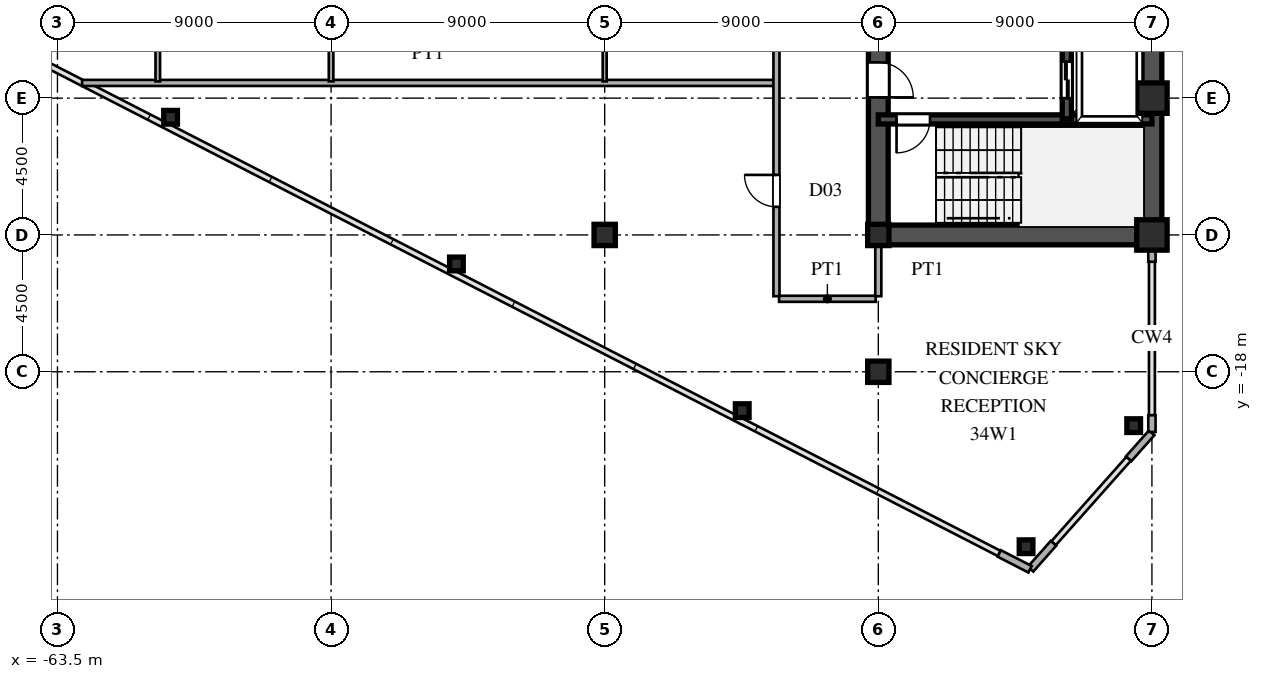
"""IFC4 building model, lengths in metres.
Left out: names, types, materials, properties, quantities, classifications, styles, units other than length and angle.
Written with IfcOpenShell. Run it as: python <this file> out.ifc"""

import sys

from ifc_helpers import new_model, si_unit, direction, frame, frame_2d, origin, origin_2d, place, context, subcontext, project, spatial, rectangle, hollow_rectangle, i_section, extrude, source, transform, mapped, element, fill, save


model = new_model("IFC4")
c1 = context("Model", 3, precision=1e-05, world=origin(), true_north=direction((0.0, 1.0)))
c2 = subcontext(c1, "Body", "Model", "MODEL_VIEW")
j1 = project(units=[si_unit("LENGTHUNIT", "METRE"), si_unit("PLANEANGLEUNIT", "RADIAN")], contexts=[c1])
p1 = place(None, origin())
s1 = spatial("IfcSite", under=j1, at=p1, CompositionType="ELEMENT")
p2 = place(p1, origin())
s2 = spatial("IfcBuilding", under=s1, at=p2, CompositionType="ELEMENT")
p3 = place(p2, frame((0.0, 0.0, 128.4)))
s3 = spatial("IfcBuildingStorey", under=s2, at=p3, CompositionType="ELEMENT", Elevation=128.4)
m1 = source(origin(), c2, "Body", "SweptSolid", [
    extrude(hollow_rectangle(XDim=1.0, YDim=1.0, WallThickness=0.042, at=origin_2d()), origin(), (0.0, 0.0, 1.0), 3.6),
])
for number, where, z_axis, x_axis in (
    (1, (-27.5, -13.5, 0.0), (0.0, 0.0, 1.0), (1.0, 0.0, 0.0)),
    (2, (-27.5, -9.0, 0.0), (0.0, 0.0, 1.0), (1.0, 0.0, 0.0)),
):
    element("IfcColumn", number, at=place(p3, frame(where, z_axis=z_axis, x_axis=x_axis)), inside=s3, PredefinedType="COLUMN", context=c2, shape_type="MappedRepresentation", body=[
        mapped(m1, transform((0.0, 0.0, 0.0), scale=1.0)),
    ])
m2 = source(origin(), c2, "Body", "SweptSolid", [
    extrude(i_section(OverallWidth=0.7, OverallDepth=0.7, WebThickness=0.028, FlangeThickness=0.045, at=origin_2d()), origin(), (0.0, 0.0, 1.0), 3.6),
])
for number, where, z_axis, x_axis in (
    (3, (-36.5, -18.0, 0.0), (0.0, 0.0, 1.0), (1.0, 0.0, 0.0)),
    (4, (-36.5, -13.5, 0.0), (0.0, 0.0, 1.0), (1.0, 0.0, 0.0)),
    (5, (-45.5, -13.5, 0.0), (0.0, 0.0, 1.0), (1.0, 0.0, 0.0)),
):
    element("IfcColumn", number, at=place(p3, frame(where, z_axis=z_axis, x_axis=x_axis)), inside=s3, PredefinedType="COLUMN", context=c2, shape_type="MappedRepresentation", body=[
        mapped(m2, transform((0.0, 0.0, 0.0), scale=1.0)),
    ])
m3 = source(origin(), c2, "Body", "SweptSolid", [
    extrude(hollow_rectangle(XDim=0.45, YDim=0.45, WallThickness=0.018, at=origin_2d()), origin(), (0.0, 0.0, 1.0), 3.6),
])
for number, where, z_axis, x_axis in (
    (6, (-28.1, -19.772, 0.0), (0.0, 0.0, 1.0), (1.0, 0.0, 0.0)),
    (7, (-31.64, -23.754, 0.0), (0.0, 0.0, 1.0), (1.0, 0.0, 0.0)),
    (8, (-40.976, -19.278, 0.0), (0.0, 0.0, 1.0), (1.0, 0.0, 0.0)),
    (9, (-50.377, -14.453, 0.0), (0.0, 0.0, 1.0), (1.0, 0.0, 0.0)),
    (10, (-59.779, -9.629, 0.0), (0.0, 0.0, 1.0), (1.0, 0.0, 0.0)),
):
    element("IfcColumn", number, at=place(p3, frame(where, z_axis=z_axis, x_axis=x_axis)), inside=s3, PredefinedType="COLUMN", context=c2, shape_type="MappedRepresentation", body=[
        mapped(m3, transform((0.0, 0.0, 0.0), scale=1.0)),
    ])
p4 = place(p3, frame((-27.5, -19.98, 0.0), z_axis=(0.0, 0.0, 1.0), x_axis=(0.0, 1.0, 0.0)))
e11 = element("IfcWall", 11, at=p4, inside=s3, PredefinedType="SOLIDWALL", context=c2, shape_type="SweptSolid", body=[
    extrude(rectangle(XDim=0.55, YDim=0.24, at=frame_2d((0.275, 0.0))), origin(), (0.0, 0.0, 1.0), 3.38),
])
p5 = place(p3, frame((-27.5, -14.38, 0.0), z_axis=(0.0, 0.0, 1.0), x_axis=(0.0, 1.0, 0.0)))
e12 = element("IfcWall", 12, at=p5, inside=s3, PredefinedType="SOLIDWALL", context=c2, shape_type="SweptSolid", body=[
    extrude(rectangle(XDim=0.55, YDim=0.24, at=frame_2d((0.275, 0.0))), origin(), (0.0, 0.0, 1.0), 2.88),
])
p6 = place(p3, frame((-32.523, -23.975, 0.0), z_axis=(0.0, 0.0, 1.0), x_axis=(0.889797395748, -0.456355776255, 0.0)))
e13 = element("IfcWall", 13, at=p6, inside=s3, PredefinedType="SOLIDWALL", context=c2, shape_type="SweptSolid", body=[
    extrude(rectangle(XDim=1.14, YDim=0.24, at=frame_2d((0.57, 0.0))), origin(), (0.0, 0.0, 1.0), 3.38),
])
for number, where, z_axis, x_axis in (
    (14, (-31.493, -24.492, 0.0), (0.0, 0.0, 1.0), (0.664, 0.747, 0.0)),
    (15, (-28.264, -20.86, 0.0), (0.0, 0.0, 1.0), (0.664, 0.747, 0.0)),
):
    element("IfcWall", number, at=place(p3, frame(where, z_axis=z_axis, x_axis=x_axis)), inside=s3, PredefinedType="SOLIDWALL", context=c2, shape_type="SweptSolid", body=[
        extrude(rectangle(XDim=1.14, YDim=0.24, at=frame_2d((0.57, 0.0))), origin(), (0.0, 0.0, 1.0), 3.38),
    ])
p7 = place(p3, frame((-27.5, -13.5, 0.0), z_axis=(0.0, 0.0, 1.0), x_axis=(0.0, 1.0, 0.0)))
e16 = element("IfcWall", 16, at=p7, inside=s3, PredefinedType="SHEAR", context=c2, shape_type="SweptSolid", body=[
    extrude(rectangle(XDim=12.2, YDim=0.65, at=frame_2d((6.1, 0.0))), origin(), (0.0, 0.0, 1.0), 3.38),
])
p8 = place(p3, frame((-36.5, -13.5, 0.0), z_axis=(0.0, 0.0, 1.0), x_axis=(1.0, 0.0, 0.0)))
e17 = element("IfcWall", 17, at=p8, inside=s3, PredefinedType="SHEAR", context=c2, shape_type="SweptSolid", body=[
    extrude(rectangle(XDim=9.0, YDim=0.65, at=frame_2d((4.5, 0.0))), origin(), (0.0, 0.0, 1.0), 3.38),
])
p9 = place(p3, frame((-36.5, -13.65, 0.0), z_axis=(0.0, 0.0, 1.0), x_axis=(0.0, 1.0, 0.0)))
e18 = element("IfcWall", 18, at=p9, inside=s3, PredefinedType="SHEAR", context=c2, shape_type="SweptSolid", body=[
    extrude(rectangle(XDim=7.15, YDim=0.65, at=frame_2d((3.575, 0.0))), origin(), (0.0, 0.0, 1.0), 3.38),
])
p10 = place(p9, frame((4.675, 0.0, 0.0)))
e19 = element("IfcOpeningElement", 19, at=p10, cuts=e18, PredefinedType="OPENING", context=c2, shape_type="SweptSolid", body=[
    extrude(rectangle(XDim=1.15, YDim=2.2, at=frame_2d((0.575, 1.1))), frame((0.0, 0.335, 0.0), z_axis=(0.0, -1.0, 0.0), x_axis=(1.0, 0.0, 0.0)), (0.0, 0.0, 1.0), 0.67),
])
p11 = place(p3, frame((-36.5, -9.7, 0.0), z_axis=(0.0, 0.0, 1.0), x_axis=(1.0, 0.0, 0.0)))
e20 = element("IfcWall", 20, at=p11, inside=s3, PredefinedType="SHEAR", context=c2, shape_type="SweptSolid", body=[
    extrude(rectangle(XDim=9.0, YDim=0.3, at=frame_2d((4.5, 0.0))), origin(), (0.0, 0.0, 1.0), 3.38),
])
p12 = place(p11, frame((0.6, 0.0, 0.0)))
e21 = element("IfcOpeningElement", 21, at=p12, cuts=e20, PredefinedType="OPENING", context=c2, shape_type="SweptSolid", body=[
    extrude(rectangle(XDim=1.1, YDim=2.2, at=frame_2d((0.55, 1.1))), frame((0.0, 0.16, 0.0), z_axis=(0.0, -1.0, 0.0), x_axis=(1.0, 0.0, 0.0)), (0.0, 0.0, 1.0), 0.32),
])
p13 = place(p3, frame((-30.3, -9.68, 0.0), z_axis=(0.0, 0.0, 1.0), x_axis=(0.0, 1.0, 0.0)))
e22 = element("IfcWall", 22, at=p13, inside=s3, PredefinedType="SHEAR", context=c2, shape_type="SweptSolid", body=[
    extrude(rectangle(XDim=2.56, YDim=0.3, at=frame_2d((1.28, 0.0))), origin(), (0.0, 0.0, 1.0), 3.38),
])
p14 = place(p13, frame((0.68, 0.0, 0.0)))
e23 = element("IfcOpeningElement", 23, at=p14, cuts=e22, PredefinedType="OPENING", context=c2, shape_type="SweptSolid", body=[
    extrude(rectangle(XDim=1.2, YDim=2.25, at=frame_2d((0.6, 1.125))), frame((0.0, 0.16, 0.0), z_axis=(0.0, -1.0, 0.0), x_axis=(1.0, 0.0, 0.0)), (0.0, 0.0, 1.0), 0.32),
])
p15 = place(p3, frame((-39.765, -15.6, 0.0), z_axis=(0.0, 0.0, 1.0), x_axis=(1.0, 0.0, 0.0)))
e24 = element("IfcWall", 24, at=p15, inside=s3, PredefinedType="PARTITIONING", context=c2, shape_type="SweptSolid", body=[
    extrude(rectangle(XDim=3.18, YDim=0.2, at=frame_2d((1.59, 0.0))), origin(), (0.0, 0.0, 1.0), 3.38),
])
p16 = place(p3, frame((-62.69, -8.5, 0.0), z_axis=(0.0, 0.0, 1.0), x_axis=(1.0, 0.0, 0.0)))
e25 = element("IfcWall", 25, at=p16, inside=s3, PredefinedType="PARTITIONING", context=c2, shape_type="SweptSolid", body=[
    extrude(rectangle(XDim=22.76, YDim=0.2, at=frame_2d((11.38, 0.0))), origin(), (0.0, 0.0, 1.0), 3.38),
])
p17 = place(p3, frame((-60.2, -8.45, 0.0), z_axis=(0.0, 0.0, 1.0), x_axis=(0.0, 1.0, 0.0)))
e26 = element("IfcWall", 26, at=p17, inside=s3, PredefinedType="PARTITIONING", context=c2, shape_type="SweptSolid", body=[
    extrude(rectangle(XDim=13.9, YDim=0.15, at=frame_2d((6.95, 0.0))), origin(), (0.0, 0.0, 1.0), 3.38),
])
p18 = place(p17, frame((1.808, 0.0, 0.0)))
e27 = element("IfcOpeningElement", 27, at=p18, cuts=e26, PredefinedType="OPENING", context=c2, shape_type="SweptSolid", body=[
    extrude(rectangle(XDim=0.95, YDim=2.15, at=frame_2d((0.475, 1.075))), frame((0.0, 0.085, 0.0), z_axis=(0.0, -1.0, 0.0), x_axis=(1.0, 0.0, 0.0)), (0.0, 0.0, 1.0), 0.17),
])
p19 = place(p17, frame((6.475, 0.0, 0.0)))
e28 = element("IfcOpeningElement", 28, at=p19, cuts=e26, PredefinedType="OPENING", context=c2, shape_type="SweptSolid", body=[
    extrude(rectangle(XDim=0.95, YDim=2.15, at=frame_2d((0.475, 1.075))), frame((0.0, 0.085, 0.0), z_axis=(0.0, -1.0, 0.0), x_axis=(1.0, 0.0, 0.0)), (0.0, 0.0, 1.0), 0.17),
])
p20 = place(p17, frame((11.142, 0.0, 0.0)))
e29 = element("IfcOpeningElement", 29, at=p20, cuts=e26, PredefinedType="OPENING", context=c2, shape_type="SweptSolid", body=[
    extrude(rectangle(XDim=0.95, YDim=2.15, at=frame_2d((0.475, 1.075))), frame((0.0, 0.085, 0.0), z_axis=(0.0, -1.0, 0.0), x_axis=(1.0, 0.0, 0.0)), (0.0, 0.0, 1.0), 0.17),
])
p21 = place(p3, frame((-54.5, -8.45, 0.0), z_axis=(0.0, 0.0, 1.0), x_axis=(0.0, 1.0, 0.0)))
e30 = element("IfcWall", 30, at=p21, inside=s3, PredefinedType="PARTITIONING", context=c2, shape_type="SweptSolid", body=[
    extrude(rectangle(XDim=13.9, YDim=0.15, at=frame_2d((6.95, 0.0))), origin(), (0.0, 0.0, 1.0), 2.78),
])
p22 = place(p21, frame((6.475, 0.0, 0.0)))
e31 = element("IfcOpeningElement", 31, at=p22, cuts=e30, PredefinedType="OPENING", context=c2, shape_type="SweptSolid", body=[
    extrude(rectangle(XDim=0.95, YDim=2.15, at=frame_2d((0.475, 1.075))), frame((0.0, 0.085, 0.0), z_axis=(0.0, -1.0, 0.0), x_axis=(1.0, 0.0, 0.0)), (0.0, 0.0, 1.0), 0.17),
])
p23 = place(p3, frame((-45.5, -8.45, 0.0), z_axis=(0.0, 0.0, 1.0), x_axis=(0.0, 1.0, 0.0)))
e32 = element("IfcWall", 32, at=p23, inside=s3, PredefinedType="PARTITIONING", context=c2, shape_type="SweptSolid", body=[
    extrude(rectangle(XDim=9.233, YDim=0.13, at=frame_2d((4.616, 0.0))), origin(), (0.0, 0.0, 1.0), 2.78),
])
p24 = place(p23, frame((6.475, 0.0, 0.0)))
e33 = element("IfcOpeningElement", 33, at=p24, cuts=e32, PredefinedType="OPENING", context=c2, shape_type="SweptSolid", body=[
    extrude(rectangle(XDim=0.95, YDim=2.15, at=frame_2d((0.475, 1.075))), frame((0.0, 0.075, 0.0), z_axis=(0.0, -1.0, 0.0), x_axis=(1.0, 0.0, 0.0)), (0.0, 0.0, 1.0), 0.15),
])
p25 = place(p3, frame((-39.85, -15.515, 0.0), z_axis=(0.0, 0.0, 1.0), x_axis=(0.0, 1.0, 0.0)))
e34 = element("IfcWall", 34, at=p25, inside=s3, PredefinedType="PARTITIONING", context=c2, shape_type="SweptSolid", body=[
    extrude(rectangle(XDim=31.03, YDim=0.2, at=frame_2d((15.515, 0.0))), origin(), (0.0, 0.0, 1.0), 3.38),
])
p26 = place(p25, frame((2.94, 0.0, 0.0)))
e35 = element("IfcOpeningElement", 35, at=p26, cuts=e34, PredefinedType="OPENING", context=c2, shape_type="SweptSolid", body=[
    extrude(rectangle(XDim=1.05, YDim=2.25, at=frame_2d((0.525, 1.125))), frame((0.0, 0.11, 0.0), z_axis=(0.0, -1.0, 0.0), x_axis=(1.0, 0.0, 0.0)), (0.0, 0.0, 1.0), 0.22),
])
p27 = place(p25, frame((13.28, 0.0, 0.0)))
e36 = element("IfcOpeningElement", 36, at=p27, cuts=e34, PredefinedType="OPENING", context=c2, shape_type="SweptSolid", body=[
    extrude(rectangle(XDim=1.05, YDim=2.25, at=frame_2d((0.525, 1.125))), frame((0.0, 0.11, 0.0), z_axis=(0.0, -1.0, 0.0), x_axis=(1.0, 0.0, 0.0)), (0.0, 0.0, 1.0), 0.22),
])
p28 = place(p25, frame((25.54, 0.0, 0.0)))
e37 = element("IfcOpeningElement", 37, at=p28, cuts=e34, PredefinedType="OPENING", context=c2, shape_type="SweptSolid", body=[
    extrude(rectangle(XDim=1.05, YDim=2.25, at=frame_2d((0.525, 1.125))), frame((0.0, 0.11, 0.0), z_axis=(0.0, -1.0, 0.0), x_axis=(1.0, 0.0, 0.0)), (0.0, 0.0, 1.0), 0.22),
])
p29 = place(p3, frame((-36.5, -15.515, 0.0), z_axis=(0.0, 0.0, 1.0), x_axis=(0.0, 1.0, 0.0)))
e38 = element("IfcWall", 38, at=p29, inside=s3, PredefinedType="PARTITIONING", context=c2, shape_type="SweptSolid", body=[
    extrude(rectangle(XDim=1.685, YDim=0.2, at=frame_2d((0.842, 0.0))), origin(), (0.0, 0.0, 1.0), 2.78),
])
m4 = source(origin(), c2, "Body", "SweptSolid", [
    extrude(rectangle(XDim=1.15, YDim=2.2, at=frame_2d((0.575, 1.1))), frame((0.0, 0.025, 0.0), z_axis=(0.0, -1.0, 0.0), x_axis=(1.0, 0.0, 0.0)), (0.0, 0.0, 1.0), 0.05),
])
p30 = place(p10, frame((1.15, 0.0, 0.0), z_axis=(0.0, 0.0, 1.0), x_axis=(-1.0, 0.0, 0.0)))
e39 = element("IfcDoor", 39, at=p30, inside=s3, OperationType="SINGLE_SWING_LEFT", PredefinedType="DOOR", context=c2, shape_type="MappedRepresentation", body=[
    mapped(m4, transform((0.0, 0.0, 0.0), scale=1.0)),
])
fill(e19, e39)
m5 = source(origin(), c2, "Body", "SweptSolid", [
    extrude(rectangle(XDim=1.1, YDim=2.2, at=frame_2d((0.55, 1.1))), frame((0.0, 0.025, 0.0), z_axis=(0.0, -1.0, 0.0), x_axis=(1.0, 0.0, 0.0)), (0.0, 0.0, 1.0), 0.05),
])
p31 = place(p12, frame((1.1, 0.0, 0.0), z_axis=(0.0, 0.0, 1.0), x_axis=(-1.0, 0.0, 0.0)))
e40 = element("IfcDoor", 40, at=p31, inside=s3, OperationType="SINGLE_SWING_LEFT", PredefinedType="DOOR", context=c2, shape_type="MappedRepresentation", body=[
    mapped(m5, transform((0.0, 0.0, 0.0), scale=1.0)),
])
fill(e21, e40)
m6 = source(origin(), c2, "Body", "SweptSolid", [
    extrude(rectangle(XDim=1.2, YDim=2.25, at=frame_2d((0.6, 1.125))), frame((0.0, 0.025, 0.0), z_axis=(0.0, -1.0, 0.0), x_axis=(1.0, 0.0, 0.0)), (0.0, 0.0, 1.0), 0.05),
])
p32 = place(p14, origin())
e41 = element("IfcDoor", 41, at=p32, inside=s3, OperationType="DOUBLE_DOOR_SLIDING", PredefinedType="DOOR", context=c2, shape_type="MappedRepresentation", body=[
    mapped(m6, transform((0.0, 0.0, 0.0), scale=1.0)),
])
fill(e23, e41)
m7 = source(origin(), c2, "Body", "SweptSolid", [
    extrude(rectangle(XDim=1.05, YDim=2.25, at=frame_2d((0.525, 1.125))), frame((0.0, 0.025, 0.0), z_axis=(0.0, -1.0, 0.0), x_axis=(1.0, 0.0, 0.0)), (0.0, 0.0, 1.0), 0.05),
])
p33 = place(p26, origin())
e42 = element("IfcDoor", 42, at=p33, inside=s3, OperationType="SINGLE_SWING_RIGHT", PredefinedType="DOOR", context=c2, shape_type="MappedRepresentation", body=[
    mapped(m7, transform((0.0, 0.0, 0.0), scale=1.0)),
])
fill(e35, e42)
save(model, sys.argv[1])
